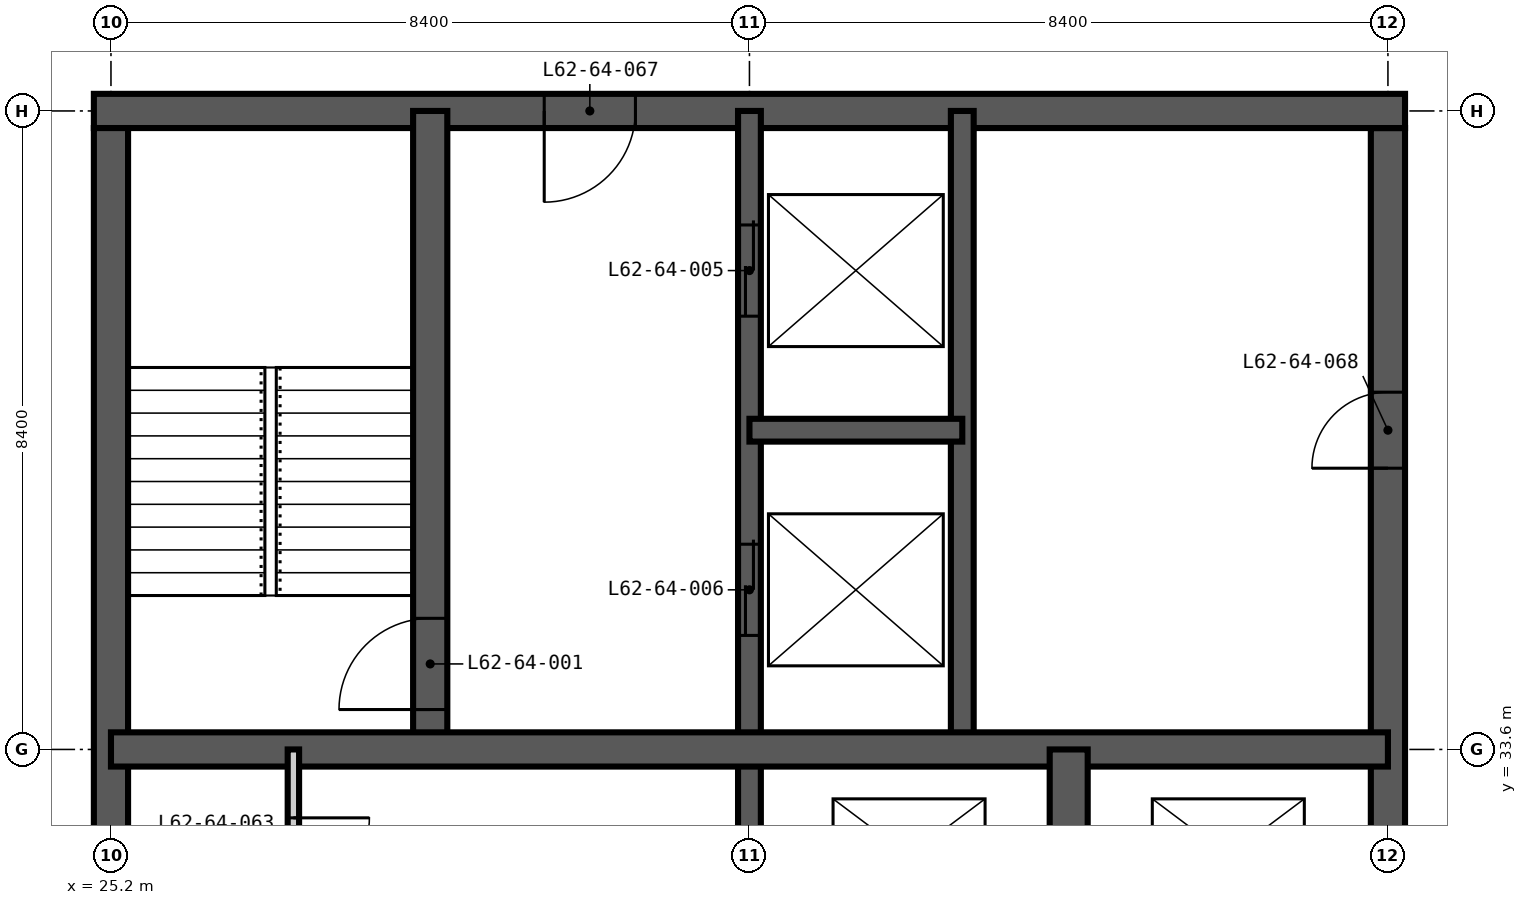
"""IFC4 building model, lengths in metres.
Left out: names, types, materials, properties, quantities, classifications, styles, units other than length and angle.
Written with IfcOpenShell. Run it as: python <this file> out.ifc"""

import sys

from ifc_helpers import new_model, si_unit, direction, frame, frame_2d, origin, place, context, subcontext, project, spatial, rectangle, extrude, element, fill, save


model = new_model("IFC4")
c1 = context("Model", 3, precision=1e-05, world=origin(), true_north=direction((0.0, 1.0)))
c2 = subcontext(c1, "Body", "Model", "MODEL_VIEW")
j1 = project(units=[si_unit("LENGTHUNIT", "METRE"), si_unit("PLANEANGLEUNIT", "RADIAN")], contexts=[c1])
p1 = place(None, origin())
s1 = spatial("IfcSite", under=j1, at=p1, CompositionType="ELEMENT")
p2 = place(p1, origin())
s2 = spatial("IfcBuilding", under=s1, at=p2, CompositionType="ELEMENT")
p3 = place(p2, frame((0.0, 0.0, 241.2)))
s3 = spatial("IfcBuildingStorey", under=s2, at=p3, CompositionType="ELEMENT", Elevation=241.2)
p4 = place(p3, frame((42.0, 17.025, -0.35), z_axis=(0.0, 0.0, 1.0), x_axis=(0.0, 1.0, 0.0)))
e1 = element("IfcWall", 1, at=p4, inside=s3, PredefinedType="SHEAR", context=c2, shape_type="SweptSolid", body=[
    extrude(rectangle(XDim=24.75, YDim=0.45, at=frame_2d((12.375, 0.0))), origin(), (0.0, 0.0, 1.0), 3.9),
])
p5 = place(p4, frame((0.575, 0.0, 0.35)))
e2 = element("IfcOpeningElement", 2, at=p5, cuts=e1, PredefinedType="OPENING", context=c2, shape_type="SweptSolid", body=[
    extrude(rectangle(XDim=1.2, YDim=2.2, at=frame_2d((0.6, 1.1))), frame((0.0, 0.235, 0.0), z_axis=(0.0, -1.0, 0.0), x_axis=(1.0, 0.0, 0.0)), (0.0, 0.0, 1.0), 0.47),
])
p6 = place(p4, frame((11.475, 0.0, 0.35)))
e3 = element("IfcOpeningElement", 3, at=p6, cuts=e1, PredefinedType="OPENING", context=c2, shape_type="SweptSolid", body=[
    extrude(rectangle(XDim=1.8, YDim=2.2, at=frame_2d((0.9, 1.1))), frame((0.0, 0.235, 0.0), z_axis=(0.0, -1.0, 0.0), x_axis=(1.0, 0.0, 0.0)), (0.0, 0.0, 1.0), 0.47),
])
p7 = place(p4, frame((20.275, 0.0, 0.35)))
e4 = element("IfcOpeningElement", 4, at=p7, cuts=e1, PredefinedType="OPENING", context=c2, shape_type="SweptSolid", body=[
    extrude(rectangle(XDim=1.0, YDim=2.1, at=frame_2d((0.5, 1.05))), frame((0.0, 0.235, 0.0), z_axis=(0.0, -1.0, 0.0), x_axis=(1.0, 0.0, 0.0)), (0.0, 0.0, 1.0), 0.47),
])
p8 = place(p3, frame((42.225, 42.0, -0.35), z_axis=(0.0, 0.0, 1.0), x_axis=(-1.0, 0.0, 0.0)))
e5 = element("IfcWall", 5, at=p8, inside=s3, PredefinedType="SHEAR", context=c2, shape_type="SweptSolid", body=[
    extrude(rectangle(XDim=17.25, YDim=0.45, at=frame_2d((8.625, 0.0))), origin(), (0.0, 0.0, 1.0), 3.9),
])
p9 = place(p8, frame((10.125, 0.0, 0.35)))
e6 = element("IfcOpeningElement", 6, at=p9, cuts=e5, PredefinedType="OPENING", context=c2, shape_type="SweptSolid", body=[
    extrude(rectangle(XDim=1.2, YDim=2.2, at=frame_2d((0.6, 1.1))), frame((0.0, 0.235, 0.0), z_axis=(0.0, -1.0, 0.0), x_axis=(1.0, 0.0, 0.0)), (0.0, 0.0, 1.0), 0.47),
])
p10 = place(p3, frame((25.2, 41.775, -0.35), z_axis=(0.0, 0.0, 1.0), x_axis=(0.0, -1.0, 0.0)))
e7 = element("IfcWall", 7, at=p10, inside=s3, PredefinedType="SHEAR", context=c2, shape_type="SweptSolid", body=[
    extrude(rectangle(XDim=24.75, YDim=0.45, at=frame_2d((12.375, 0.0))), origin(), (0.0, 0.0, 1.0), 3.9),
])
p11 = place(p10, frame((11.875, 0.0, 0.35)))
e8 = element("IfcOpeningElement", 8, at=p11, cuts=e7, PredefinedType="OPENING", context=c2, shape_type="SweptSolid", body=[
    extrude(rectangle(XDim=1.0, YDim=2.1, at=frame_2d((0.5, 1.05))), frame((0.0, 0.235, 0.0), z_axis=(0.0, -1.0, 0.0), x_axis=(1.0, 0.0, 0.0)), (0.0, 0.0, 1.0), 0.47),
])
p12 = place(p3, frame((33.6, 16.8, -0.35), z_axis=(0.0, 0.0, 1.0), x_axis=(0.0, 1.0, 0.0)))
e9 = element("IfcWall", 9, at=p12, inside=s3, PredefinedType="SHEAR", context=c2, shape_type="SweptSolid", body=[
    extrude(rectangle(XDim=25.2, YDim=0.3, at=frame_2d((12.6, 0.0))), origin(), (0.0, 0.0, 1.0), 3.9),
])
p13 = place(p12, frame((22.5, 0.0, 0.35)))
e10 = element("IfcOpeningElement", 10, at=p13, cuts=e9, PredefinedType="OPENING", context=c2, shape_type="SweptSolid", body=[
    extrude(rectangle(XDim=1.2, YDim=2.2, at=frame_2d((0.6, 1.1))), frame((0.0, 0.16, 0.0), z_axis=(0.0, -1.0, 0.0), x_axis=(1.0, 0.0, 0.0)), (0.0, 0.0, 1.0), 0.32),
])
p14 = place(p12, frame((18.3, 0.0, 0.35)))
e11 = element("IfcOpeningElement", 11, at=p14, cuts=e9, PredefinedType="OPENING", context=c2, shape_type="SweptSolid", body=[
    extrude(rectangle(XDim=1.2, YDim=2.2, at=frame_2d((0.6, 1.1))), frame((0.0, 0.16, 0.0), z_axis=(0.0, -1.0, 0.0), x_axis=(1.0, 0.0, 0.0)), (0.0, 0.0, 1.0), 0.32),
])
p15 = place(p12, frame((9.3, 0.0, 0.35)))
e12 = element("IfcOpeningElement", 12, at=p15, cuts=e9, PredefinedType="OPENING", context=c2, shape_type="SweptSolid", body=[
    extrude(rectangle(XDim=1.0, YDim=2.1, at=frame_2d((0.5, 1.05))), frame((0.0, 0.16, 0.0), z_axis=(0.0, -1.0, 0.0), x_axis=(1.0, 0.0, 0.0)), (0.0, 0.0, 1.0), 0.32),
])
p16 = place(p3, frame((36.4, 33.6, -0.35), z_axis=(0.0, 0.0, 1.0), x_axis=(0.0, 1.0, 0.0)))
e13 = element("IfcWall", 13, at=p16, inside=s3, PredefinedType="SHEAR", context=c2, shape_type="SweptSolid", body=[
    extrude(rectangle(XDim=8.4, YDim=0.3, at=frame_2d((4.2, 0.0))), origin(), (0.0, 0.0, 1.0), 3.9),
])
p17 = place(p3, frame((33.6, 37.8, -0.35), z_axis=(0.0, 0.0, 1.0), x_axis=(1.0, 0.0, 0.0)))
e14 = element("IfcWall", 14, at=p17, inside=s3, PredefinedType="SHEAR", context=c2, shape_type="SweptSolid", body=[
    extrude(rectangle(XDim=2.8, YDim=0.3, at=frame_2d((1.4, 0.0))), origin(), (0.0, 0.0, 1.0), 3.9),
])
p18 = place(p3, frame((29.4, 33.6, -0.35), z_axis=(0.0, 0.0, 1.0), x_axis=(0.0, 1.0, 0.0)))
e15 = element("IfcWall", 15, at=p18, inside=s3, PredefinedType="SHEAR", context=c2, shape_type="SweptSolid", body=[
    extrude(rectangle(XDim=8.4, YDim=0.45, at=frame_2d((4.2, 0.0))), origin(), (0.0, 0.0, 1.0), 3.9),
])
p19 = place(p18, frame((0.525, 0.0, 0.35)))
e16 = element("IfcOpeningElement", 16, at=p19, cuts=e15, PredefinedType="OPENING", context=c2, shape_type="SweptSolid", body=[
    extrude(rectangle(XDim=1.2, YDim=2.2, at=frame_2d((0.6, 1.1))), frame((0.0, 0.235, 0.0), z_axis=(0.0, -1.0, 0.0), x_axis=(1.0, 0.0, 0.0)), (0.0, 0.0, 1.0), 0.47),
])
p20 = place(p3, frame((25.2, 33.6, -0.35), z_axis=(0.0, 0.0, 1.0), x_axis=(1.0, 0.0, 0.0)))
e17 = element("IfcWall", 17, at=p20, inside=s3, PredefinedType="SHEAR", context=c2, shape_type="SweptSolid", body=[
    extrude(rectangle(XDim=16.8, YDim=0.45, at=frame_2d((8.4, 0.0))), origin(), (0.0, 0.0, 1.0), 3.9),
])
p21 = place(p3, frame((37.8, 30.8, -0.35), z_axis=(0.0, 0.0, 1.0), x_axis=(0.0, 1.0, 0.0)))
e18 = element("IfcWall", 18, at=p21, inside=s3, PredefinedType="SHEAR", context=c2, shape_type="SweptSolid", body=[
    extrude(rectangle(XDim=2.8, YDim=0.5, at=frame_2d((1.4, 0.0))), origin(), (0.0, 0.0, 1.0), 3.9),
])
p22 = place(p3, frame((27.6, 25.2, 0.0), z_axis=(0.0, 0.0, 1.0), x_axis=(0.0, 1.0, 0.0)))
e19 = element("IfcWall", 19, at=p22, inside=s3, PredefinedType="PARTITIONING", context=c2, shape_type="SweptSolid", body=[
    extrude(rectangle(XDim=8.4, YDim=0.15, at=frame_2d((4.2, 0.0))), origin(), (0.0, 0.0, 1.0), 3.55),
])
p23 = place(p22, frame((2.3, 0.0, 0.0)))
e20 = element("IfcOpeningElement", 20, at=p23, cuts=e19, PredefinedType="OPENING", context=c2, shape_type="SweptSolid", body=[
    extrude(rectangle(XDim=1.0, YDim=2.1, at=frame_2d((0.5, 1.05))), frame((0.0, 0.085, 0.0), z_axis=(0.0, -1.0, 0.0), x_axis=(1.0, 0.0, 0.0)), (0.0, 0.0, 1.0), 0.17),
])
p24 = place(p22, frame((6.5, 0.0, 0.0)))
e21 = element("IfcOpeningElement", 21, at=p24, cuts=e19, PredefinedType="OPENING", context=c2, shape_type="SweptSolid", body=[
    extrude(rectangle(XDim=1.0, YDim=2.1, at=frame_2d((0.5, 1.05))), frame((0.0, 0.085, 0.0), z_axis=(0.0, -1.0, 0.0), x_axis=(1.0, 0.0, 0.0)), (0.0, 0.0, 1.0), 0.17),
])
p25 = place(p19, origin())
e22 = element("IfcDoor", 22, at=p25, inside=s3, OperationType="SINGLE_SWING_LEFT", PredefinedType="DOOR", context=c2, shape_type="SweptSolid", body=[
    extrude(rectangle(XDim=1.2, YDim=2.2, at=frame_2d((0.6, 1.1))), frame((0.0, 0.025, 0.0), z_axis=(0.0, -1.0, 0.0), x_axis=(1.0, 0.0, 0.0)), (0.0, 0.0, 1.0), 0.05),
])
fill(e16, e22)
p26 = place(p13, origin())
e23 = element("IfcDoor", 23, at=p26, inside=s3, OperationType="DOUBLE_DOOR_SLIDING", PredefinedType="DOOR", context=c2, shape_type="SweptSolid", body=[
    extrude(rectangle(XDim=1.2, YDim=2.2, at=frame_2d((0.6, 1.1))), frame((0.0, 0.025, 0.0), z_axis=(0.0, -1.0, 0.0), x_axis=(1.0, 0.0, 0.0)), (0.0, 0.0, 1.0), 0.05),
])
fill(e10, e23)
p27 = place(p14, origin())
e24 = element("IfcDoor", 24, at=p27, inside=s3, OperationType="DOUBLE_DOOR_SLIDING", PredefinedType="DOOR", context=c2, shape_type="SweptSolid", body=[
    extrude(rectangle(XDim=1.2, YDim=2.2, at=frame_2d((0.6, 1.1))), frame((0.0, 0.025, 0.0), z_axis=(0.0, -1.0, 0.0), x_axis=(1.0, 0.0, 0.0)), (0.0, 0.0, 1.0), 0.05),
])
fill(e11, e24)
p28 = place(p24, frame((1.0, 0.0, 0.0), z_axis=(0.0, 0.0, 1.0), x_axis=(-1.0, 0.0, 0.0)))
e25 = element("IfcDoor", 25, at=p28, inside=s3, OperationType="SINGLE_SWING_LEFT", PredefinedType="DOOR", context=c2, shape_type="SweptSolid", body=[
    extrude(rectangle(XDim=1.0, YDim=2.1, at=frame_2d((0.5, 1.05))), frame((0.0, 0.025, 0.0), z_axis=(0.0, -1.0, 0.0), x_axis=(1.0, 0.0, 0.0)), (0.0, 0.0, 1.0), 0.05),
])
fill(e21, e25)
p29 = place(p9, origin())
e26 = element("IfcDoor", 26, at=p29, inside=s3, OperationType="SINGLE_SWING_RIGHT", PredefinedType="DOOR", context=c2, shape_type="SweptSolid", body=[
    extrude(rectangle(XDim=1.2, YDim=2.2, at=frame_2d((0.6, 1.1))), frame((0.0, 0.025, 0.0), z_axis=(0.0, -1.0, 0.0), x_axis=(1.0, 0.0, 0.0)), (0.0, 0.0, 1.0), 0.05),
])
fill(e6, e26)
p30 = place(p7, origin())
e27 = element("IfcDoor", 27, at=p30, inside=s3, OperationType="SINGLE_SWING_LEFT", PredefinedType="DOOR", context=c2, shape_type="SweptSolid", body=[
    extrude(rectangle(XDim=1.0, YDim=2.1, at=frame_2d((0.5, 1.05))), frame((0.0, 0.025, 0.0), z_axis=(0.0, -1.0, 0.0), x_axis=(1.0, 0.0, 0.0)), (0.0, 0.0, 1.0), 0.05),
])
fill(e4, e27)
save(model, sys.argv[1])
